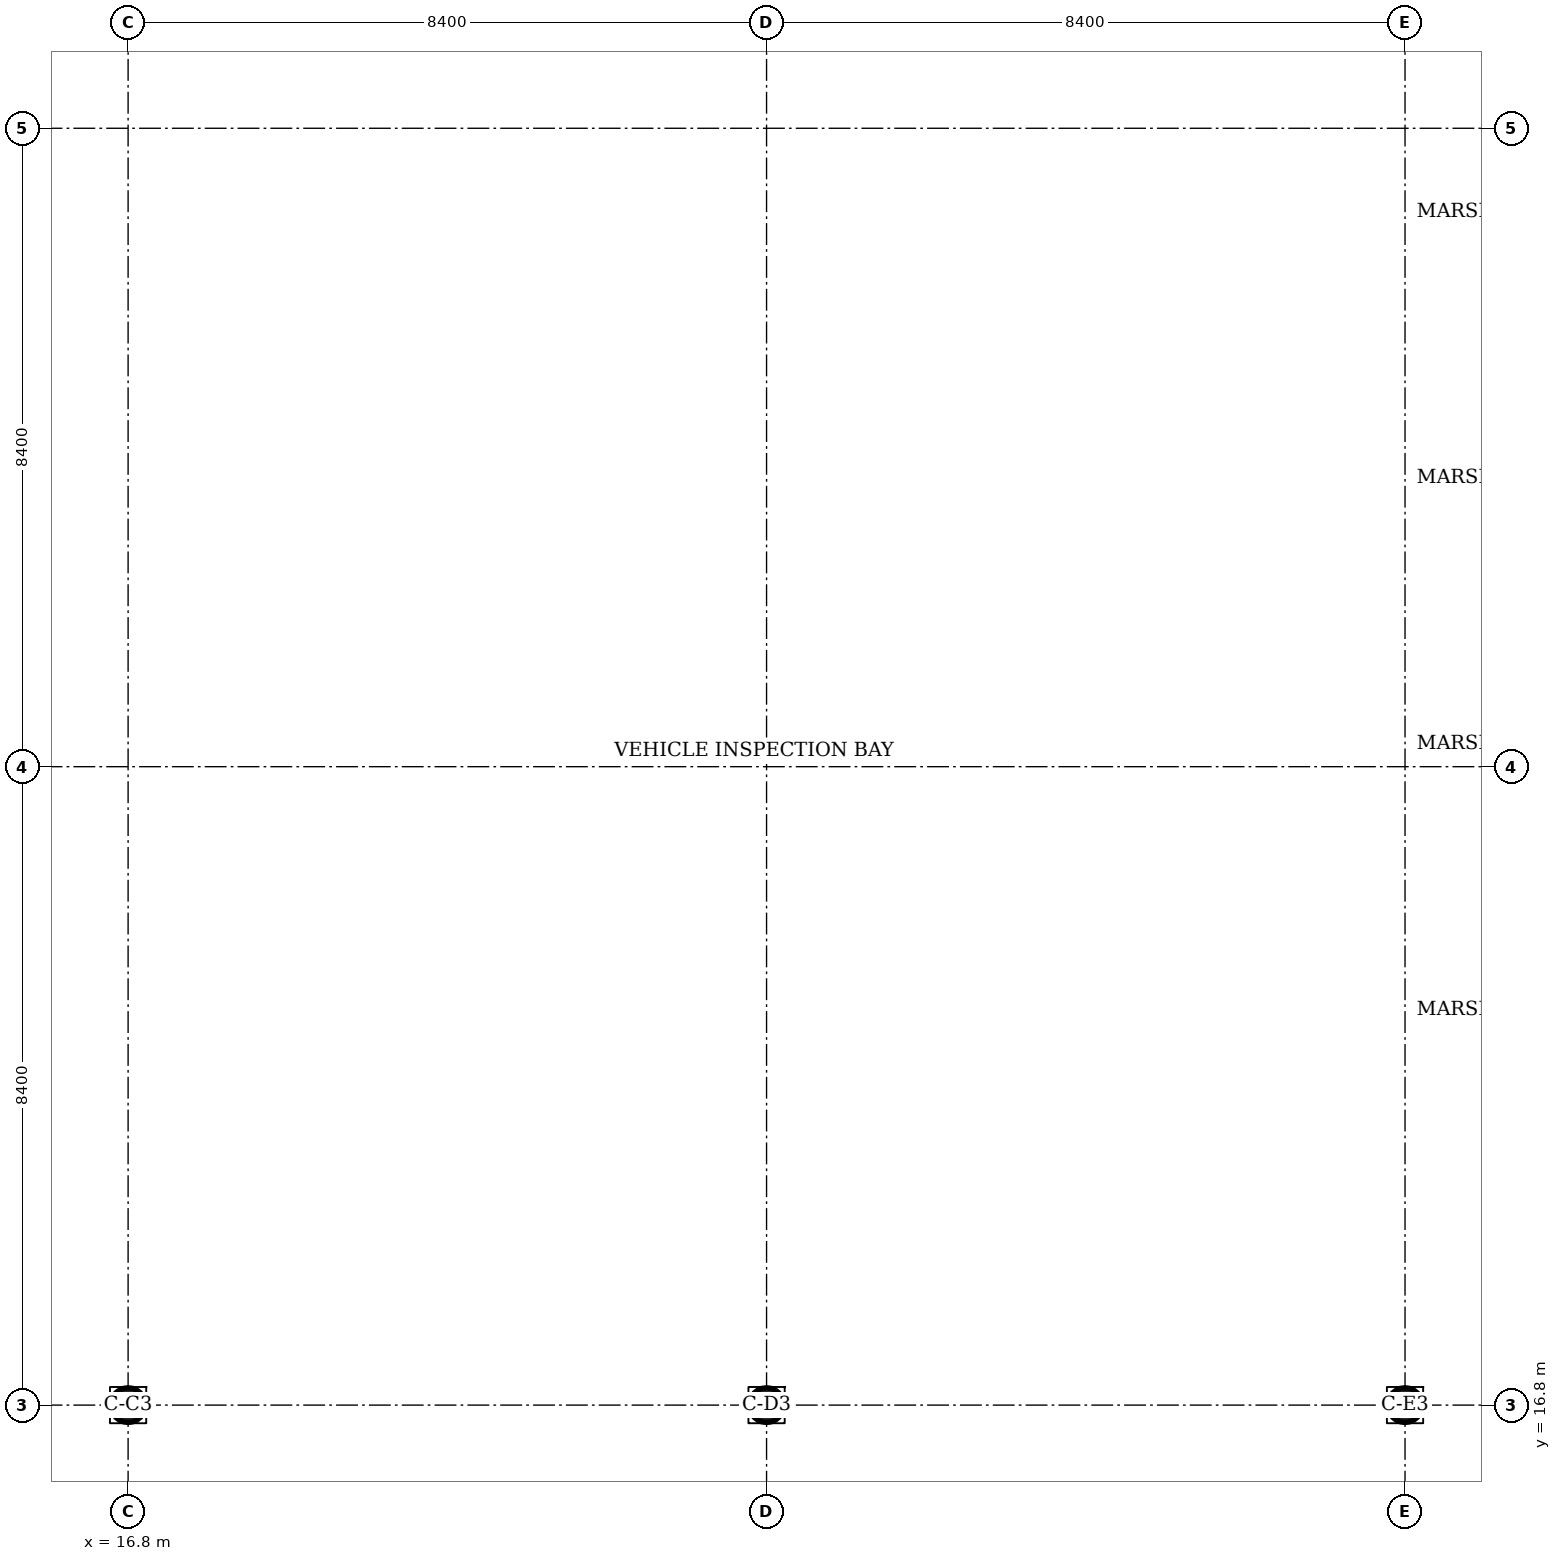
"""IFC4 building model, lengths in metres.
Left out: names, types, materials, properties, quantities, classifications, styles, units other than length and angle.
Written with IfcOpenShell. Run it as: python <this file> out.ifc"""

import sys

from ifc_helpers import new_model, si_unit, direction, frame, origin, origin_2d, place, context, subcontext, project, spatial, hollow_circle, extrude, element, save


model = new_model("IFC4")
c1 = context("Model", 3, precision=1e-05, world=origin(), true_north=direction((0.0, 1.0)))
c2 = subcontext(c1, "Body", "Model", "MODEL_VIEW")
j1 = project(units=[si_unit("LENGTHUNIT", "METRE"), si_unit("PLANEANGLEUNIT", "RADIAN")], contexts=[c1])
p1 = place(None, origin())
s1 = spatial("IfcSite", under=j1, at=p1, CompositionType="ELEMENT")
p2 = place(p1, origin())
s2 = spatial("IfcBuilding", under=s1, at=p2, CompositionType="ELEMENT")
p3 = place(p2, origin())
s3 = spatial("IfcBuildingStorey", under=s2, at=p3, CompositionType="ELEMENT", Elevation=0.0)
for number, where, z_axis, x_axis in (
    (1, (16.8, 16.8, -0.7), (0.0, 0.0, 1.0), (1.0, 0.0, 0.0)),
    (2, (25.2, 16.8, -0.7), (0.0, 0.0, 1.0), (1.0, 0.0, 0.0)),
    (3, (33.6, 16.8, -0.7), (0.0, 0.0, 1.0), (1.0, 0.0, 0.0)),
):
    element("IfcColumn", number, at=place(p3, frame(where, z_axis=z_axis, x_axis=x_axis)), inside=s3, PredefinedType="COLUMN", context=c2, shape_type="SweptSolid", body=[
        extrude(hollow_circle(Radius=0.229, WallThickness=0.016, at=origin_2d()), origin(), (0.0, 0.0, 1.0), 5.7),
    ])
save(model, sys.argv[1])
